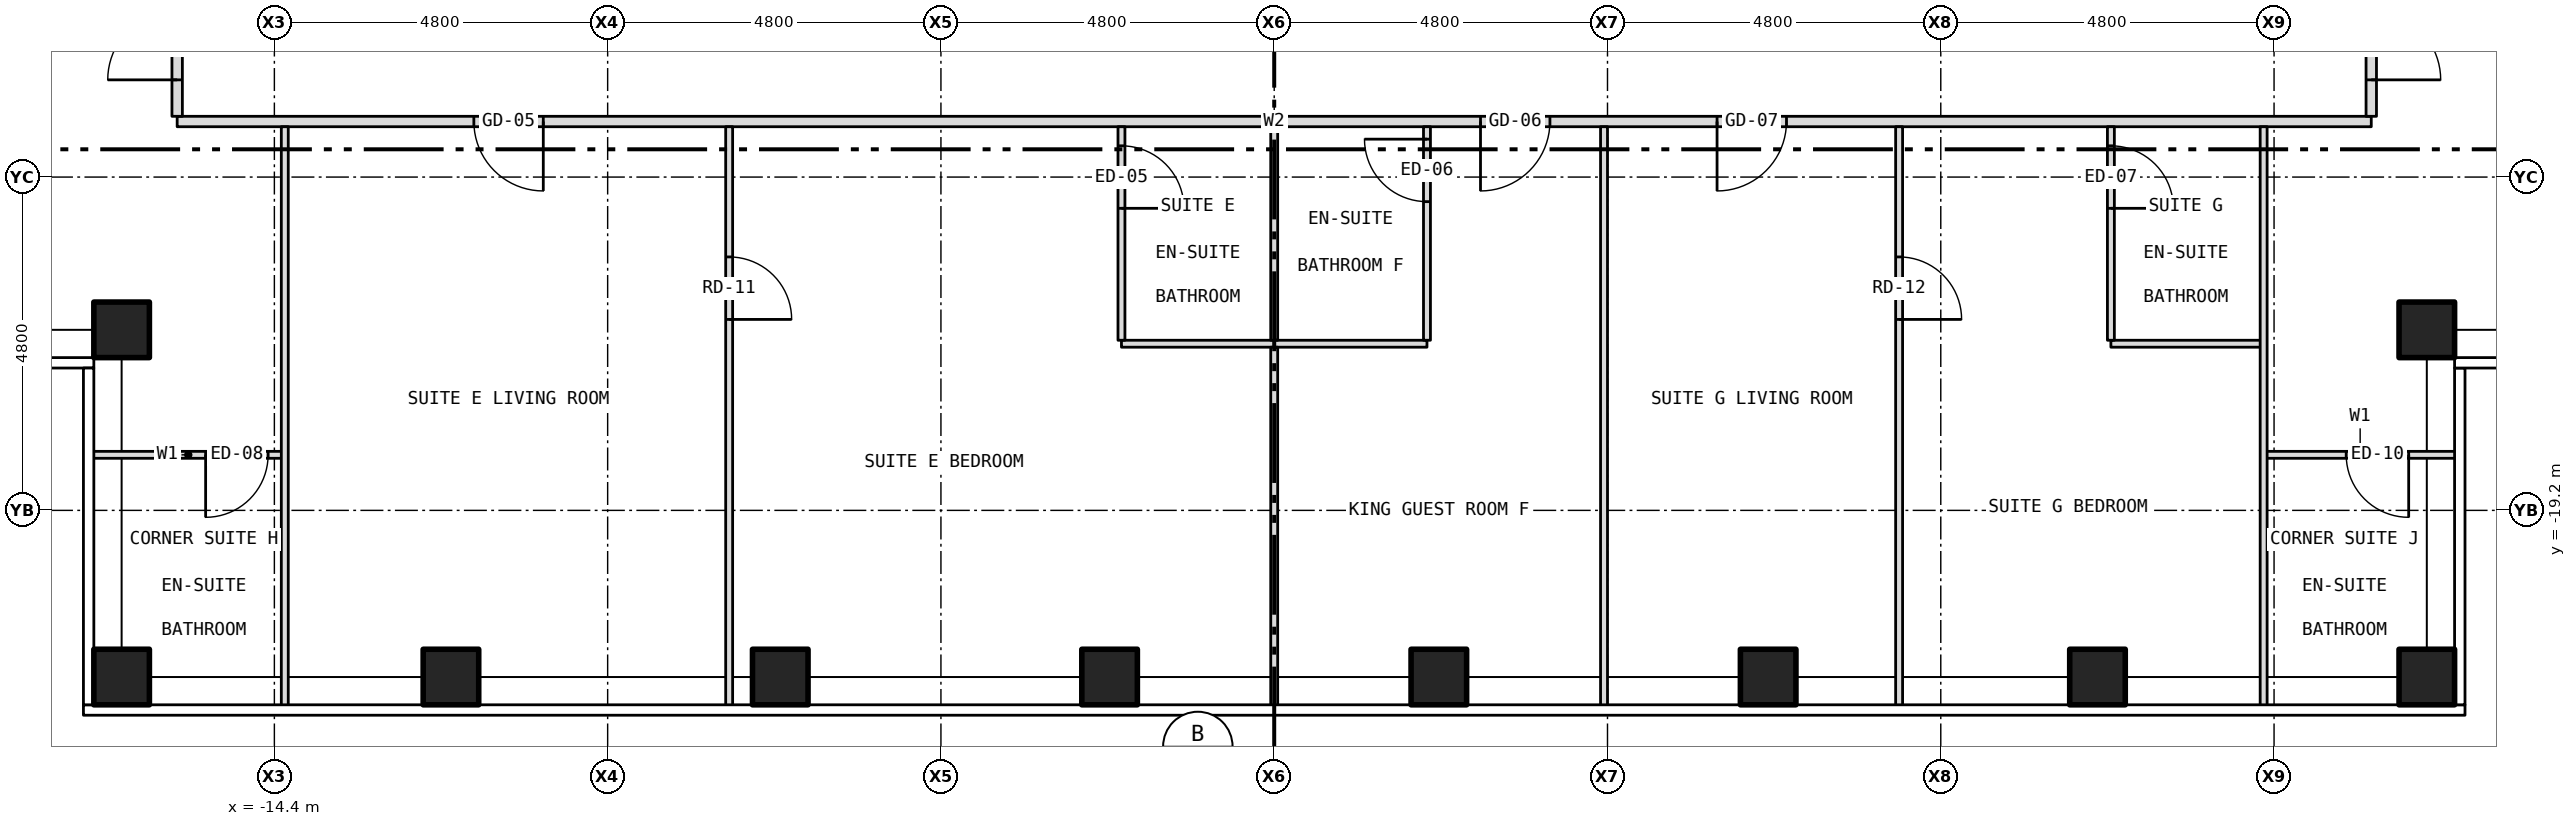
"""IFC4 building model, lengths in metres.
Left out: names, types, materials, properties, quantities, classifications, styles, units other than length and angle.
Written with IfcOpenShell. Run it as: python <this file> out.ifc"""

import sys

from ifc_helpers import new_model, si_unit, direction, frame, frame_2d, origin, origin_2d, place, context, subcontext, project, spatial, rectangle, hollow_rectangle, extrude, element, fill, save


model = new_model("IFC4")
c1 = context("Model", 3, precision=1e-05, world=origin(), true_north=direction((0.0, 1.0)))
c2 = subcontext(c1, "Body", "Model", "MODEL_VIEW")
j1 = project(units=[si_unit("LENGTHUNIT", "METRE"), si_unit("PLANEANGLEUNIT", "RADIAN")], contexts=[c1])
p1 = place(None, origin())
s1 = spatial("IfcSite", under=j1, at=p1, CompositionType="ELEMENT")
p2 = place(p1, origin())
s2 = spatial("IfcBuilding", under=s1, at=p2, CompositionType="ELEMENT")
p3 = place(p2, frame((0.0, 0.0, 169.0)))
s3 = spatial("IfcBuildingStorey", under=s2, at=p3, CompositionType="ELEMENT", Elevation=169.0)
for number, where, z_axis, x_axis in (
    (1, (-16.6, -21.6, -0.15), (0.0, 0.0, 1.0), (1.0, 0.0, 0.0)),
    (2, (-11.857, -21.6, -0.15), (0.0, 0.0, 1.0), (1.0, 0.0, 0.0)),
    (3, (-7.114, -21.6, -0.15), (0.0, 0.0, 1.0), (1.0, 0.0, 0.0)),
    (4, (-2.371, -21.6, -0.15), (0.0, 0.0, 1.0), (1.0, 0.0, 0.0)),
    (5, (2.371, -21.6, -0.15), (0.0, 0.0, 1.0), (1.0, 0.0, 0.0)),
    (6, (7.114, -21.6, -0.15), (0.0, 0.0, 1.0), (1.0, 0.0, 0.0)),
    (7, (11.857, -21.6, -0.15), (0.0, 0.0, 1.0), (1.0, 0.0, 0.0)),
    (8, (16.6, -21.6, -0.15), (0.0, 0.0, 1.0), (1.0, 0.0, 0.0)),
    (9, (-16.6, -16.6, -0.15), (0.0, 0.0, 1.0), (1.0, 0.0, 0.0)),
    (10, (16.6, -16.6, -0.15), (0.0, 0.0, 1.0), (1.0, 0.0, 0.0)),
):
    element("IfcColumn", number, at=place(p3, frame(where, z_axis=z_axis, x_axis=x_axis)), inside=s3, PredefinedType="COLUMN", context=c2, shape_type="SweptSolid", body=[
        extrude(hollow_rectangle(XDim=0.8, YDim=0.8, WallThickness=0.045, at=origin_2d()), origin(), (0.0, 0.0, 1.0), 3.5),
    ])
p4 = place(p3, frame((-17.03, -18.4, 0.0), z_axis=(0.0, 0.0, 1.0), x_axis=(1.0, 0.0, 0.0)))
e11 = element("IfcWall", 11, at=p4, inside=s3, PredefinedType="PARTITIONING", context=c2, shape_type="SweptSolid", body=[
    extrude(rectangle(XDim=2.78, YDim=0.1, at=frame_2d((1.39, 0.0))), origin(), (0.0, 0.0, 1.0), 3.35),
])
p5 = place(p4, frame((1.64, 0.0, 0.0)))
e12 = element("IfcOpeningElement", 12, at=p5, cuts=e11, PredefinedType="OPENING", context=c2, shape_type="SweptSolid", body=[
    extrude(rectangle(XDim=0.9, YDim=2.1, at=frame_2d((0.45, 1.05))), frame((0.0, 0.062, 0.0), z_axis=(0.0, -1.0, 0.0), x_axis=(1.0, 0.0, 0.0)), (0.0, 0.0, 1.0), 0.124),
])
p6 = place(p3, frame((14.25, -18.4, 0.0), z_axis=(0.0, 0.0, 1.0), x_axis=(1.0, 0.0, 0.0)))
e13 = element("IfcWall", 13, at=p6, inside=s3, PredefinedType="PARTITIONING", context=c2, shape_type="SweptSolid", body=[
    extrude(rectangle(XDim=2.78, YDim=0.1, at=frame_2d((1.39, 0.0))), origin(), (0.0, 0.0, 1.0), 3.35),
])
p7 = place(p6, frame((1.189, 0.0, 0.0)))
e14 = element("IfcOpeningElement", 14, at=p7, cuts=e13, PredefinedType="OPENING", context=c2, shape_type="SweptSolid", body=[
    extrude(rectangle(XDim=0.9, YDim=2.1, at=frame_2d((0.45, 1.05))), frame((0.0, 0.062, 0.0), z_axis=(0.0, -1.0, 0.0), x_axis=(1.0, 0.0, 0.0)), (0.0, 0.0, 1.0), 0.124),
])
p8 = place(p3, frame((-2.2, -16.8, 0.0), z_axis=(0.0, 0.0, 1.0), x_axis=(1.0, 0.0, 0.0)))
e15 = element("IfcWall", 15, at=p8, inside=s3, PredefinedType="PARTITIONING", context=c2, shape_type="SweptSolid", body=[
    extrude(rectangle(XDim=4.4, YDim=0.1, at=frame_2d((2.2, 0.0))), origin(), (0.0, 0.0, 1.0), 3.35),
])
p9 = place(p3, frame((12.05, -16.8, 0.0), z_axis=(0.0, 0.0, 1.0), x_axis=(1.0, 0.0, 0.0)))
e16 = element("IfcWall", 16, at=p9, inside=s3, PredefinedType="PARTITIONING", context=c2, shape_type="SweptSolid", body=[
    extrude(rectangle(XDim=2.2, YDim=0.1, at=frame_2d((1.1, 0.0))), origin(), (0.0, 0.0, 1.0), 3.35),
])
p10 = place(p3, frame((-15.8, -13.6, 0.0), z_axis=(0.0, 0.0, 1.0), x_axis=(1.0, 0.0, 0.0)))
e17 = element("IfcWall", 17, at=p10, inside=s3, PredefinedType="PARTITIONING", context=c2, shape_type="SweptSolid", body=[
    extrude(rectangle(XDim=31.6, YDim=0.15, at=frame_2d((15.8, 0.0))), origin(), (0.0, 0.0, 1.0), 3.35),
])
p11 = place(p10, frame((4.273, 0.0, 0.0)))
e18 = element("IfcOpeningElement", 18, at=p11, cuts=e17, PredefinedType="OPENING", context=c2, shape_type="SweptSolid", body=[
    extrude(rectangle(XDim=1.0, YDim=2.1, at=frame_2d((0.5, 1.05))), frame((0.0, 0.087, 0.0), z_axis=(0.0, -1.0, 0.0), x_axis=(1.0, 0.0, 0.0)), (0.0, 0.0, 1.0), 0.174),
])
p12 = place(p10, frame((18.771, 0.0, 0.0)))
e19 = element("IfcOpeningElement", 19, at=p12, cuts=e17, PredefinedType="OPENING", context=c2, shape_type="SweptSolid", body=[
    extrude(rectangle(XDim=1.0, YDim=2.1, at=frame_2d((0.5, 1.05))), frame((0.0, 0.087, 0.0), z_axis=(0.0, -1.0, 0.0), x_axis=(1.0, 0.0, 0.0)), (0.0, 0.0, 1.0), 0.174),
])
p13 = place(p10, frame((22.178, 0.0, 0.0)))
e20 = element("IfcOpeningElement", 20, at=p13, cuts=e17, PredefinedType="OPENING", context=c2, shape_type="SweptSolid", body=[
    extrude(rectangle(XDim=1.0, YDim=2.1, at=frame_2d((0.5, 1.05))), frame((0.0, 0.087, 0.0), z_axis=(0.0, -1.0, 0.0), x_axis=(1.0, 0.0, 0.0)), (0.0, 0.0, 1.0), 0.174),
])
p14 = place(p3, frame((-15.8, -13.525, 0.0), z_axis=(0.0, 0.0, 1.0), x_axis=(0.0, 1.0, 0.0)))
e21 = element("IfcWall", 21, at=p14, inside=s3, PredefinedType="PARTITIONING", context=c2, shape_type="SweptSolid", body=[
    extrude(rectangle(XDim=2.605, YDim=0.15, at=frame_2d((1.302, 0.0))), origin(), (0.0, 0.0, 1.0), 3.35),
])
p15 = place(p14, frame((0.525, 0.0, 0.0)))
e22 = element("IfcOpeningElement", 22, at=p15, cuts=e21, PredefinedType="OPENING", context=c2, shape_type="SweptSolid", body=[
    extrude(rectangle(XDim=1.0, YDim=2.1, at=frame_2d((0.5, 1.05))), frame((0.0, 0.087, 0.0), z_axis=(0.0, -1.0, 0.0), x_axis=(1.0, 0.0, 0.0)), (0.0, 0.0, 1.0), 0.174),
])
p16 = place(p3, frame((-14.25, -22.03, 0.0), z_axis=(0.0, 0.0, 1.0), x_axis=(0.0, 1.0, 0.0)))
e23 = element("IfcWall", 23, at=p16, inside=s3, PredefinedType="PARTITIONING", context=c2, shape_type="SweptSolid", body=[
    extrude(rectangle(XDim=8.355, YDim=0.1, at=frame_2d((4.177, 0.0))), origin(), (0.0, 0.0, 1.0), 2.817),
])
p17 = place(p3, frame((-7.85, -22.03, 0.0), z_axis=(0.0, 0.0, 1.0), x_axis=(0.0, 1.0, 0.0)))
e24 = element("IfcWall", 24, at=p17, inside=s3, PredefinedType="PARTITIONING", context=c2, shape_type="SweptSolid", body=[
    extrude(rectangle(XDim=8.355, YDim=0.1, at=frame_2d((4.177, 0.0))), origin(), (0.0, 0.0, 1.0), 3.35),
])
p18 = place(p17, frame((5.58, 0.0, 0.0)))
e25 = element("IfcOpeningElement", 25, at=p18, cuts=e24, PredefinedType="OPENING", context=c2, shape_type="SweptSolid", body=[
    extrude(rectangle(XDim=0.9, YDim=2.1, at=frame_2d((0.45, 1.05))), frame((0.0, 0.062, 0.0), z_axis=(0.0, -1.0, 0.0), x_axis=(1.0, 0.0, 0.0)), (0.0, 0.0, 1.0), 0.124),
])
p19 = place(p3, frame((-2.2, -16.75, 0.0), z_axis=(0.0, 0.0, 1.0), x_axis=(0.0, 1.0, 0.0)))
e26 = element("IfcWall", 26, at=p19, inside=s3, PredefinedType="PARTITIONING", context=c2, shape_type="SweptSolid", body=[
    extrude(rectangle(XDim=3.075, YDim=0.1, at=frame_2d((1.538, 0.0))), origin(), (0.0, 0.0, 1.0), 3.35),
])
p20 = place(p19, frame((1.9, 0.0, 0.0)))
e27 = element("IfcOpeningElement", 27, at=p20, cuts=e26, PredefinedType="OPENING", context=c2, shape_type="SweptSolid", body=[
    extrude(rectangle(XDim=0.9, YDim=2.1, at=frame_2d((0.45, 1.05))), frame((0.0, 0.062, 0.0), z_axis=(0.0, -1.0, 0.0), x_axis=(1.0, 0.0, 0.0)), (0.0, 0.0, 1.0), 0.124),
])
p21 = place(p3, frame((0.0, -22.03, 0.0), z_axis=(0.0, 0.0, 1.0), x_axis=(0.0, 1.0, 0.0)))
e28 = element("IfcWall", 28, at=p21, inside=s3, PredefinedType="PARTITIONING", context=c2, shape_type="SweptSolid", body=[
    extrude(rectangle(XDim=5.18, YDim=0.1, at=frame_2d((2.59, 0.0))), origin(), (0.0, 0.0, 1.0), 2.728),
])
p22 = place(p3, frame((0.0, -16.75, 0.0), z_axis=(0.0, 0.0, 1.0), x_axis=(0.0, 1.0, 0.0)))
e29 = element("IfcWall", 29, at=p22, inside=s3, PredefinedType="PARTITIONING", context=c2, shape_type="SweptSolid", body=[
    extrude(rectangle(XDim=3.075, YDim=0.1, at=frame_2d((1.538, 0.0))), origin(), (0.0, 0.0, 1.0), 2.728),
])
p23 = place(p3, frame((2.2, -16.75, 0.0), z_axis=(0.0, 0.0, 1.0), x_axis=(0.0, 1.0, 0.0)))
e30 = element("IfcWall", 30, at=p23, inside=s3, PredefinedType="PARTITIONING", context=c2, shape_type="SweptSolid", body=[
    extrude(rectangle(XDim=3.075, YDim=0.1, at=frame_2d((1.538, 0.0))), origin(), (0.0, 0.0, 1.0), 3.35),
])
p24 = place(p23, frame((1.996, 0.0, 0.0)))
e31 = element("IfcOpeningElement", 31, at=p24, cuts=e30, PredefinedType="OPENING", context=c2, shape_type="SweptSolid", body=[
    extrude(rectangle(XDim=0.9, YDim=2.1, at=frame_2d((0.45, 1.05))), frame((0.0, 0.062, 0.0), z_axis=(0.0, -1.0, 0.0), x_axis=(1.0, 0.0, 0.0)), (0.0, 0.0, 1.0), 0.124),
])
p25 = place(p3, frame((4.75, -22.03, 0.0), z_axis=(0.0, 0.0, 1.0), x_axis=(0.0, 1.0, 0.0)))
e32 = element("IfcWall", 32, at=p25, inside=s3, PredefinedType="PARTITIONING", context=c2, shape_type="SweptSolid", body=[
    extrude(rectangle(XDim=8.355, YDim=0.1, at=frame_2d((4.177, 0.0))), origin(), (0.0, 0.0, 1.0), 2.817),
])
p26 = place(p3, frame((9.0, -22.03, 0.0), z_axis=(0.0, 0.0, 1.0), x_axis=(0.0, 1.0, 0.0)))
e33 = element("IfcWall", 33, at=p26, inside=s3, PredefinedType="PARTITIONING", context=c2, shape_type="SweptSolid", body=[
    extrude(rectangle(XDim=8.355, YDim=0.1, at=frame_2d((4.177, 0.0))), origin(), (0.0, 0.0, 1.0), 3.35),
])
p27 = place(p26, frame((5.58, 0.0, 0.0)))
e34 = element("IfcOpeningElement", 34, at=p27, cuts=e33, PredefinedType="OPENING", context=c2, shape_type="SweptSolid", body=[
    extrude(rectangle(XDim=0.9, YDim=2.1, at=frame_2d((0.45, 1.05))), frame((0.0, 0.062, 0.0), z_axis=(0.0, -1.0, 0.0), x_axis=(1.0, 0.0, 0.0)), (0.0, 0.0, 1.0), 0.124),
])
p28 = place(p3, frame((12.05, -16.75, 0.0), z_axis=(0.0, 0.0, 1.0), x_axis=(0.0, 1.0, 0.0)))
e35 = element("IfcWall", 35, at=p28, inside=s3, PredefinedType="PARTITIONING", context=c2, shape_type="SweptSolid", body=[
    extrude(rectangle(XDim=3.075, YDim=0.1, at=frame_2d((1.538, 0.0))), origin(), (0.0, 0.0, 1.0), 3.35),
])
p29 = place(p28, frame((1.9, 0.0, 0.0)))
e36 = element("IfcOpeningElement", 36, at=p29, cuts=e35, PredefinedType="OPENING", context=c2, shape_type="SweptSolid", body=[
    extrude(rectangle(XDim=0.9, YDim=2.1, at=frame_2d((0.45, 1.05))), frame((0.0, 0.062, 0.0), z_axis=(0.0, -1.0, 0.0), x_axis=(1.0, 0.0, 0.0)), (0.0, 0.0, 1.0), 0.124),
])
p30 = place(p3, frame((14.25, -22.03, 0.0), z_axis=(0.0, 0.0, 1.0), x_axis=(0.0, 1.0, 0.0)))
e37 = element("IfcWall", 37, at=p30, inside=s3, PredefinedType="PARTITIONING", context=c2, shape_type="SweptSolid", body=[
    extrude(rectangle(XDim=8.355, YDim=0.1, at=frame_2d((4.177, 0.0))), origin(), (0.0, 0.0, 1.0), 2.817),
])
p31 = place(p3, frame((15.8, -13.525, 0.0), z_axis=(0.0, 0.0, 1.0), x_axis=(0.0, 1.0, 0.0)))
e38 = element("IfcWall", 38, at=p31, inside=s3, PredefinedType="PARTITIONING", context=c2, shape_type="SweptSolid", body=[
    extrude(rectangle(XDim=2.605, YDim=0.15, at=frame_2d((1.302, 0.0))), origin(), (0.0, 0.0, 1.0), 3.35),
])
p32 = place(p31, frame((0.525, 0.0, 0.0)))
e39 = element("IfcOpeningElement", 39, at=p32, cuts=e38, PredefinedType="OPENING", context=c2, shape_type="SweptSolid", body=[
    extrude(rectangle(XDim=1.0, YDim=2.1, at=frame_2d((0.5, 1.05))), frame((0.0, 0.087, 0.0), z_axis=(0.0, -1.0, 0.0), x_axis=(1.0, 0.0, 0.0)), (0.0, 0.0, 1.0), 0.174),
])
p33 = place(p11, origin())
e40 = element("IfcDoor", 40, at=p33, inside=s3, OperationType="SINGLE_SWING_RIGHT", PredefinedType="DOOR", context=c2, shape_type="SweptSolid", body=[
    extrude(rectangle(XDim=1.0, YDim=2.1, at=frame_2d((0.5, 1.05))), frame((0.0, 0.025, 0.0), z_axis=(0.0, -1.0, 0.0), x_axis=(1.0, 0.0, 0.0)), (0.0, 0.0, 1.0), 0.05),
])
fill(e18, e40)
p34 = place(p18, origin())
e41 = element("IfcDoor", 41, at=p34, inside=s3, OperationType="SINGLE_SWING_LEFT", PredefinedType="DOOR", context=c2, shape_type="SweptSolid", body=[
    extrude(rectangle(XDim=0.9, YDim=2.1, at=frame_2d((0.45, 1.05))), frame((0.0, 0.025, 0.0), z_axis=(0.0, -1.0, 0.0), x_axis=(1.0, 0.0, 0.0)), (0.0, 0.0, 1.0), 0.05),
])
fill(e25, e41)
p35 = place(p20, origin())
e42 = element("IfcDoor", 42, at=p35, inside=s3, OperationType="SINGLE_SWING_LEFT", PredefinedType="DOOR", context=c2, shape_type="SweptSolid", body=[
    extrude(rectangle(XDim=0.9, YDim=2.1, at=frame_2d((0.45, 1.05))), frame((0.0, 0.025, 0.0), z_axis=(0.0, -1.0, 0.0), x_axis=(1.0, 0.0, 0.0)), (0.0, 0.0, 1.0), 0.05),
])
fill(e27, e42)
p36 = place(p12, origin())
e43 = element("IfcDoor", 43, at=p36, inside=s3, OperationType="SINGLE_SWING_LEFT", PredefinedType="DOOR", context=c2, shape_type="SweptSolid", body=[
    extrude(rectangle(XDim=1.0, YDim=2.1, at=frame_2d((0.5, 1.05))), frame((0.0, 0.025, 0.0), z_axis=(0.0, -1.0, 0.0), x_axis=(1.0, 0.0, 0.0)), (0.0, 0.0, 1.0), 0.05),
])
fill(e19, e43)
p37 = place(p24, origin())
e44 = element("IfcDoor", 44, at=p37, inside=s3, OperationType="SINGLE_SWING_RIGHT", PredefinedType="DOOR", context=c2, shape_type="SweptSolid", body=[
    extrude(rectangle(XDim=0.9, YDim=2.1, at=frame_2d((0.45, 1.05))), frame((0.0, 0.025, 0.0), z_axis=(0.0, -1.0, 0.0), x_axis=(1.0, 0.0, 0.0)), (0.0, 0.0, 1.0), 0.05),
])
fill(e31, e44)
p38 = place(p13, origin())
e45 = element("IfcDoor", 45, at=p38, inside=s3, OperationType="SINGLE_SWING_LEFT", PredefinedType="DOOR", context=c2, shape_type="SweptSolid", body=[
    extrude(rectangle(XDim=1.0, YDim=2.1, at=frame_2d((0.5, 1.05))), frame((0.0, 0.025, 0.0), z_axis=(0.0, -1.0, 0.0), x_axis=(1.0, 0.0, 0.0)), (0.0, 0.0, 1.0), 0.05),
])
fill(e20, e45)
p39 = place(p27, origin())
e46 = element("IfcDoor", 46, at=p39, inside=s3, OperationType="SINGLE_SWING_LEFT", PredefinedType="DOOR", context=c2, shape_type="SweptSolid", body=[
    extrude(rectangle(XDim=0.9, YDim=2.1, at=frame_2d((0.45, 1.05))), frame((0.0, 0.025, 0.0), z_axis=(0.0, -1.0, 0.0), x_axis=(1.0, 0.0, 0.0)), (0.0, 0.0, 1.0), 0.05),
])
fill(e34, e46)
p40 = place(p29, origin())
e47 = element("IfcDoor", 47, at=p40, inside=s3, OperationType="SINGLE_SWING_LEFT", PredefinedType="DOOR", context=c2, shape_type="SweptSolid", body=[
    extrude(rectangle(XDim=0.9, YDim=2.1, at=frame_2d((0.45, 1.05))), frame((0.0, 0.025, 0.0), z_axis=(0.0, -1.0, 0.0), x_axis=(1.0, 0.0, 0.0)), (0.0, 0.0, 1.0), 0.05),
])
fill(e36, e47)
p41 = place(p5, origin())
e48 = element("IfcDoor", 48, at=p41, inside=s3, OperationType="SINGLE_SWING_LEFT", PredefinedType="DOOR", context=c2, shape_type="SweptSolid", body=[
    extrude(rectangle(XDim=0.9, YDim=2.1, at=frame_2d((0.45, 1.05))), frame((0.0, 0.025, 0.0), z_axis=(0.0, -1.0, 0.0), x_axis=(1.0, 0.0, 0.0)), (0.0, 0.0, 1.0), 0.05),
])
fill(e12, e48)
p42 = place(p15, origin())
e49 = element("IfcDoor", 49, at=p42, inside=s3, OperationType="SINGLE_SWING_LEFT", PredefinedType="DOOR", context=c2, shape_type="SweptSolid", body=[
    extrude(rectangle(XDim=1.0, YDim=2.1, at=frame_2d((0.5, 1.05))), frame((0.0, 0.025, 0.0), z_axis=(0.0, -1.0, 0.0), x_axis=(1.0, 0.0, 0.0)), (0.0, 0.0, 1.0), 0.05),
])
fill(e22, e49)
p43 = place(p7, origin())
e50 = element("IfcDoor", 50, at=p43, inside=s3, OperationType="SINGLE_SWING_RIGHT", PredefinedType="DOOR", context=c2, shape_type="SweptSolid", body=[
    extrude(rectangle(XDim=0.9, YDim=2.1, at=frame_2d((0.45, 1.05))), frame((0.0, 0.025, 0.0), z_axis=(0.0, -1.0, 0.0), x_axis=(1.0, 0.0, 0.0)), (0.0, 0.0, 1.0), 0.05),
])
fill(e14, e50)
p44 = place(p32, origin())
e51 = element("IfcDoor", 51, at=p44, inside=s3, OperationType="SINGLE_SWING_LEFT", PredefinedType="DOOR", context=c2, shape_type="SweptSolid", body=[
    extrude(rectangle(XDim=1.0, YDim=2.1, at=frame_2d((0.5, 1.05))), frame((0.0, 0.025, 0.0), z_axis=(0.0, -1.0, 0.0), x_axis=(1.0, 0.0, 0.0)), (0.0, 0.0, 1.0), 0.05),
])
fill(e39, e51)
save(model, sys.argv[1])
